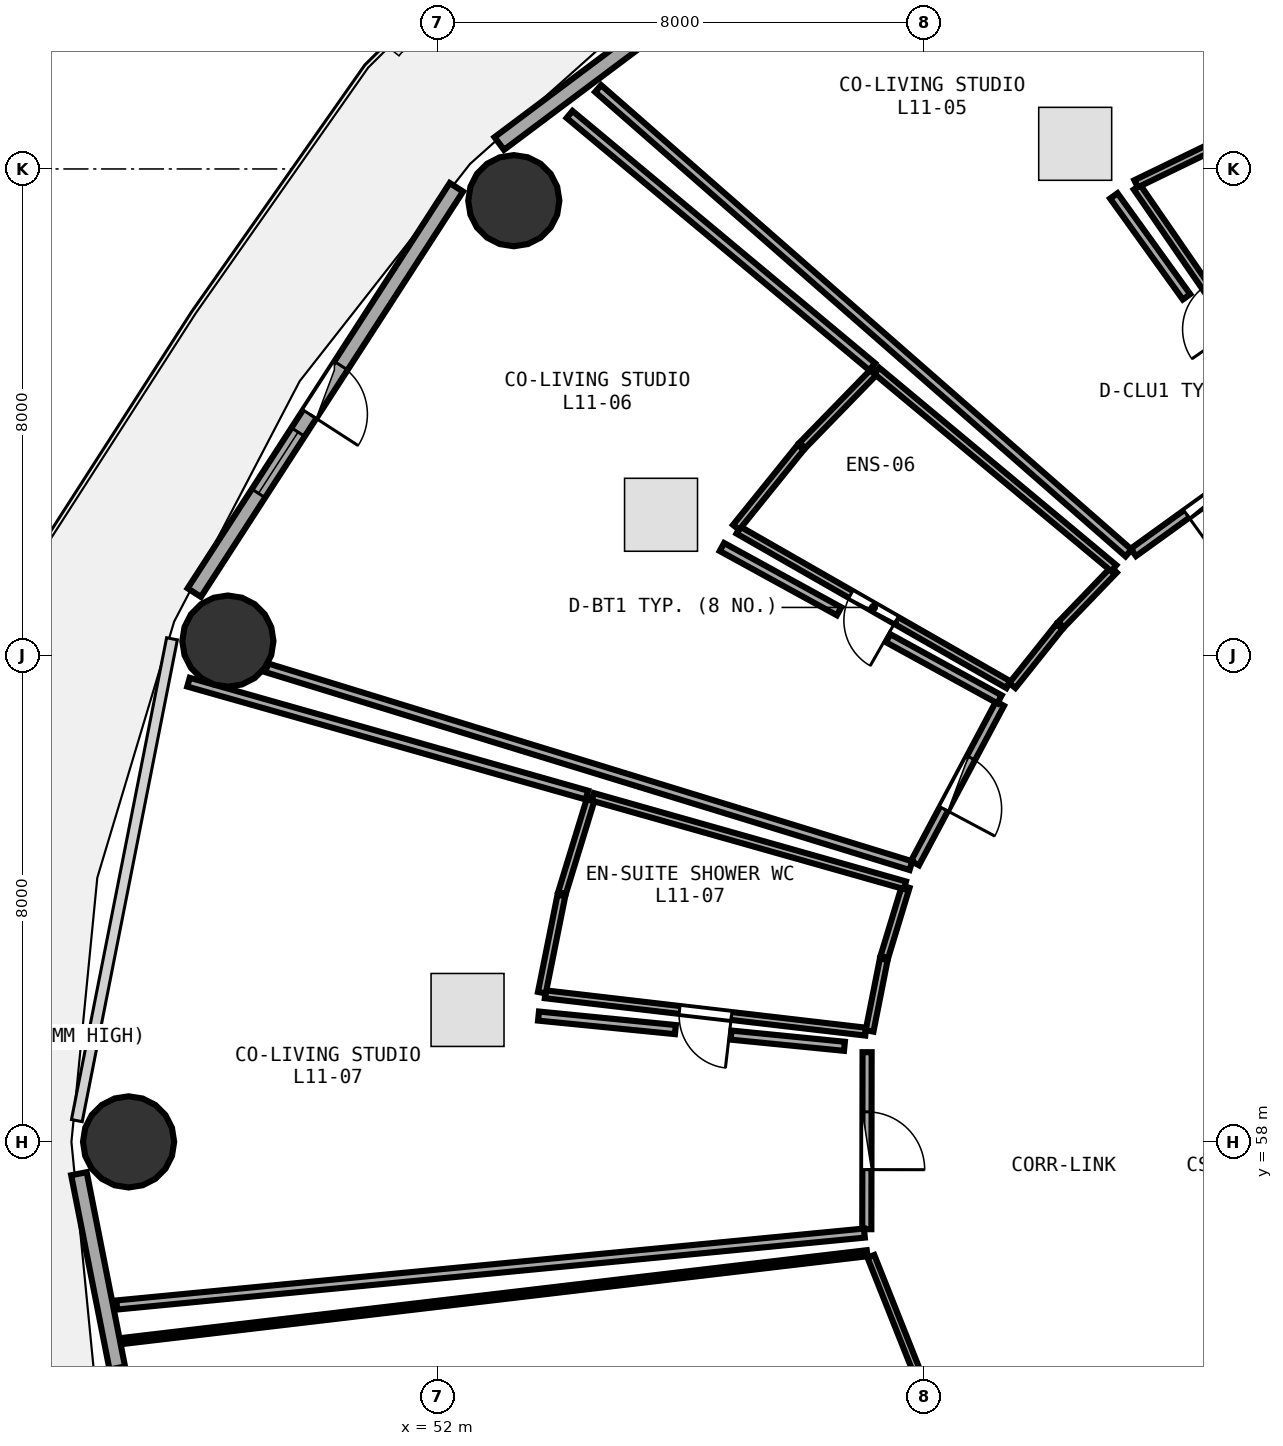
"""IFC4 building model, lengths in metres.
Left out: names, types, materials, properties, quantities, classifications, styles, units other than length and angle.
Written with IfcOpenShell. Run it as: python <this file> out.ifc"""

import sys

from ifc_helpers import new_model, si_unit, direction, frame, frame_2d, origin, origin_2d, place, context, subcontext, project, spatial, rectangle, circle, extrude, element, fill, save


model = new_model("IFC4")
c1 = context("Model", 3, precision=1e-05, world=origin(), true_north=direction((0.0, 1.0)))
c2 = subcontext(c1, "Body", "Model", "MODEL_VIEW")
j1 = project(units=[si_unit("LENGTHUNIT", "METRE"), si_unit("PLANEANGLEUNIT", "RADIAN")], contexts=[c1])
p1 = place(None, origin())
s1 = spatial("IfcSite", under=j1, at=p1, CompositionType="ELEMENT")
p2 = place(p1, origin())
s2 = spatial("IfcBuilding", under=s1, at=p2, CompositionType="ELEMENT")
p3 = place(p2, frame((0.0, 0.0, 45.0)))
s3 = spatial("IfcBuildingStorey", under=s2, at=p3, CompositionType="ELEMENT", Elevation=45.0)
for number, where, z_axis, x_axis in (
    (1, (53.256, 73.478, 0.0), (0.0, 0.0, 1.0), (1.0, 0.0, 0.0)),
    (2, (48.553, 66.236, 0.0), (0.0, 0.0, 1.0), (1.0, 0.0, 0.0)),
    (3, (46.92, 58.0, 0.0), (0.0, 0.0, 1.0), (1.0, 0.0, 0.0)),
):
    element("IfcColumn", number, at=place(p3, frame(where, z_axis=z_axis, x_axis=x_axis)), inside=s3, PredefinedType="COLUMN", context=c2, shape_type="SweptSolid", body=[
        extrude(circle(Radius=0.75, at=origin_2d()), origin(), (0.0, 0.0, 1.0), 3.75),
    ])
p4 = place(p3, frame((59.651, 79.389, 0.0), z_axis=(0.0, 0.0, 1.0), x_axis=(-0.80030733173, -0.599590005569, 0.0)))
e4 = element("IfcWall", 4, at=p4, inside=s3, PredefinedType="SOLIDWALL", context=c2, shape_type="SweptSolid", body=[
    extrude(rectangle(XDim=8.291, YDim=0.26, at=frame_2d((4.145, 0.0))), origin(), (0.0, 0.0, 1.0), 3.475),
])
p5 = place(p4, frame((3.345, 0.0, 0.85)))
e5 = element("IfcOpeningElement", 5, at=p5, cuts=e4, PredefinedType="OPENING", context=c2, shape_type="SweptSolid", body=[
    extrude(rectangle(XDim=1.6, YDim=1.45, at=frame_2d((0.8, 0.725))), frame((0.0, 0.14, 0.0), z_axis=(0.0, -1.0, 0.0), x_axis=(1.0, 0.0, 0.0)), (0.0, 0.0, 1.0), 0.28),
])
p6 = place(p3, frame((52.311, 73.698, 0.0), z_axis=(0.0, 0.0, 1.0), x_axis=(-0.543005114258, -0.839729388488, 0.0)))
e6 = element("IfcWall", 6, at=p6, inside=s3, PredefinedType="SOLIDWALL", context=c2, shape_type="SweptSolid", body=[
    extrude(rectangle(XDim=7.938, YDim=0.26, at=frame_2d((3.969, 0.0))), origin(), (0.0, 0.0, 1.0), 3.475),
])
p7 = place(p6, frame((3.494, 0.0, 0.0)))
e7 = element("IfcOpeningElement", 7, at=p7, cuts=e6, PredefinedType="OPENING", context=c2, shape_type="SweptSolid", body=[
    extrude(rectangle(XDim=0.95, YDim=2.1, at=frame_2d((0.475, 1.05))), frame((0.0, 0.14, 0.0), z_axis=(0.0, -1.0, 0.0), x_axis=(1.0, 0.0, 0.0)), (0.0, 0.0, 1.0), 0.28),
])
p8 = place(p6, frame((4.794, 0.0, 0.85)))
e8 = element("IfcOpeningElement", 8, at=p8, cuts=e6, PredefinedType="OPENING", context=c2, shape_type="SweptSolid", body=[
    extrude(rectangle(XDim=1.2, YDim=1.45, at=frame_2d((0.6, 0.725))), frame((0.0, 0.14, 0.0), z_axis=(0.0, -1.0, 0.0), x_axis=(1.0, 0.0, 0.0)), (0.0, 0.0, 1.0), 0.28),
])
p9 = place(p3, frame((46.104, 57.477, 0.0), z_axis=(0.0, 0.0, 1.0), x_axis=(0.193726159581, -0.98105564322, 0.0)))
e9 = element("IfcWall", 9, at=p9, inside=s3, PredefinedType="SOLIDWALL", context=c2, shape_type="SweptSolid", body=[
    extrude(rectangle(XDim=7.703, YDim=0.26, at=frame_2d((3.851, 0.0))), origin(), (0.0, 0.0, 1.0), 3.475),
])
p10 = place(p9, frame((3.231, 0.0, 0.85)))
e10 = element("IfcOpeningElement", 10, at=p10, cuts=e9, PredefinedType="OPENING", context=c2, shape_type="SweptSolid", body=[
    extrude(rectangle(XDim=1.6, YDim=1.45, at=frame_2d((0.8, 0.725))), frame((0.0, 0.14, 0.0), z_axis=(0.0, -1.0, 0.0), x_axis=(1.0, 0.0, 0.0)), (0.0, 0.0, 1.0), 0.28),
])
p11 = place(p3, frame((66.235, 69.738, 0.0), z_axis=(0.0, 0.0, 1.0), x_axis=(-0.567426867042, 0.823423797664, 0.0)))
e11 = element("IfcWall", 11, at=p11, inside=s3, PredefinedType="PLUMBINGWALL", context=c2, shape_type="SweptSolid", body=[
    extrude(rectangle(XDim=4.809, YDim=0.13, at=frame_2d((2.405, 0.0))), origin(), (0.0, 0.0, 1.0), 3.175),
])
p12 = place(p11, frame((1.975, 0.0, 0.0)))
e12 = element("IfcOpeningElement", 12, at=p12, cuts=e11, PredefinedType="OPENING", context=c2, shape_type="SweptSolid", body=[
    extrude(rectangle(XDim=0.86, YDim=2.05, at=frame_2d((0.43, 1.025))), frame((0.0, 0.075, 0.0), z_axis=(0.0, -1.0, 0.0), x_axis=(1.0, 0.0, 0.0)), (0.0, 0.0, 1.0), 0.15),
])
p13 = place(p3, frame((65.963, 69.511, 0.0), z_axis=(0.0, 0.0, 1.0), x_axis=(-0.811021116066, -0.585016879496, 0.0)))
e13 = element("IfcWall", 13, at=p13, inside=s3, PredefinedType="PARTITIONING", context=c2, shape_type="SweptSolid", body=[
    extrude(rectangle(XDim=3.106, YDim=0.15, at=frame_2d((1.553, 0.0))), origin(), (0.0, 0.0, 1.0), 2.875),
])
p14 = place(p13, frame((1.078, 0.0, 0.0)))
e14 = element("IfcOpeningElement", 14, at=p14, cuts=e13, PredefinedType="OPENING", context=c2, shape_type="SweptSolid", body=[
    extrude(rectangle(XDim=0.95, YDim=2.08, at=frame_2d((0.475, 1.04))), frame((0.0, 0.085, 0.0), z_axis=(0.0, -1.0, 0.0), x_axis=(1.0, 0.0, 0.0)), (0.0, 0.0, 1.0), 0.17),
])
p15 = place(p3, frame((61.39, 65.519, 0.0), z_axis=(0.0, 0.0, 1.0), x_axis=(-0.867813964862, 0.496889245598, 0.0)))
e15 = element("IfcWall", 15, at=p15, inside=s3, PredefinedType="PLUMBINGWALL", context=c2, shape_type="SweptSolid", body=[
    extrude(rectangle(XDim=5.115, YDim=0.13, at=frame_2d((2.557, 0.0))), origin(), (0.0, 0.0, 1.0), 2.875),
])
p16 = place(p15, frame((2.127, 0.0, 0.0)))
e16 = element("IfcOpeningElement", 16, at=p16, cuts=e15, PredefinedType="OPENING", context=c2, shape_type="SweptSolid", body=[
    extrude(rectangle(XDim=0.86, YDim=2.05, at=frame_2d((0.43, 1.025))), frame((0.0, 0.075, 0.0), z_axis=(0.0, -1.0, 0.0), x_axis=(1.0, 0.0, 0.0)), (0.0, 0.0, 1.0), 0.15),
])
p17 = place(p3, frame((61.251, 65.206, 0.0), z_axis=(0.0, 0.0, 1.0), x_axis=(-0.470332327533, -0.882489377657, 0.0)))
e17 = element("IfcWall", 17, at=p17, inside=s3, PredefinedType="PARTITIONING", context=c2, shape_type="SweptSolid", body=[
    extrude(rectangle(XDim=2.971, YDim=0.15, at=frame_2d((1.486, 0.0))), origin(), (0.0, 0.0, 1.0), 2.875),
])
p18 = place(p17, frame((1.011, 0.0, 0.0)))
e18 = element("IfcOpeningElement", 18, at=p18, cuts=e17, PredefinedType="OPENING", context=c2, shape_type="SweptSolid", body=[
    extrude(rectangle(XDim=0.95, YDim=2.08, at=frame_2d((0.475, 1.04))), frame((0.0, 0.085, 0.0), z_axis=(0.0, -1.0, 0.0), x_axis=(1.0, 0.0, 0.0)), (0.0, 0.0, 1.0), 0.17),
])
p19 = place(p3, frame((59.043, 59.813, 0.0), z_axis=(0.0, 0.0, 1.0), x_axis=(-0.99328280677, 0.115711994952, 0.0)))
e19 = element("IfcWall", 19, at=p19, inside=s3, PredefinedType="PLUMBINGWALL", context=c2, shape_type="SweptSolid", body=[
    extrude(rectangle(XDim=5.306, YDim=0.13, at=frame_2d((2.653, 0.0))), origin(), (0.0, 0.0, 1.0), 3.175),
])
p20 = place(p19, frame((2.223, 0.0, 0.0)))
e20 = element("IfcOpeningElement", 20, at=p20, cuts=e19, PredefinedType="OPENING", context=c2, shape_type="SweptSolid", body=[
    extrude(rectangle(XDim=0.86, YDim=2.05, at=frame_2d((0.43, 1.025))), frame((0.0, 0.075, 0.0), z_axis=(0.0, -1.0, 0.0), x_axis=(1.0, 0.0, 0.0)), (0.0, 0.0, 1.0), 0.15),
])
p21 = place(p3, frame((59.066, 59.475, 0.0), z_axis=(0.0, 0.0, 1.0), x_axis=(-0.001677287141, -0.999998593353, 0.0)))
e21 = element("IfcWall", 21, at=p21, inside=s3, PredefinedType="PARTITIONING", context=c2, shape_type="SweptSolid", body=[
    extrude(rectangle(XDim=2.911, YDim=0.15, at=frame_2d((1.456, 0.0))), origin(), (0.0, 0.0, 1.0), 2.875),
])
p22 = place(p21, frame((0.981, 0.0, 0.0)))
e22 = element("IfcOpeningElement", 22, at=p22, cuts=e21, PredefinedType="OPENING", context=c2, shape_type="SweptSolid", body=[
    extrude(rectangle(XDim=0.95, YDim=2.08, at=frame_2d((0.475, 1.04))), frame((0.0, 0.085, 0.0), z_axis=(0.0, -1.0, 0.0), x_axis=(1.0, 0.0, 0.0)), (0.0, 0.0, 1.0), 0.17),
])
p23 = place(p3, frame((59.128, 56.118, 0.0), z_axis=(0.0, 0.0, 1.0), x_axis=(0.369903929858, -0.929070009566, 0.0)))
e23 = element("IfcWall", 23, at=p23, inside=s3, PredefinedType="PARTITIONING", context=c2, shape_type="SweptSolid", body=[
    extrude(rectangle(XDim=5.693, YDim=0.12, at=frame_2d((2.846, 0.0))), origin(), (0.0, 0.0, 1.0), 2.875),
])
p24 = place(p23, frame((2.396, 0.0, 0.0)))
e24 = element("IfcOpeningElement", 24, at=p24, cuts=e23, PredefinedType="OPENING", context=c2, shape_type="SweptSolid", body=[
    extrude(rectangle(XDim=0.9, YDim=2.08, at=frame_2d((0.45, 1.04))), frame((0.0, 0.07, 0.0), z_axis=(0.0, -1.0, 0.0), x_axis=(1.0, 0.0, 0.0)), (0.0, 0.0, 1.0), 0.14),
])
p25 = place(p3, frame((63.49, 73.757, 0.0), z_axis=(0.0, 0.0, 1.0), x_axis=(0.899832096889, 0.436236400829, 0.0)))
e25 = element("IfcWall", 25, at=p25, inside=s3, PredefinedType="PLUMBINGWALL", context=c2, shape_type="SweptSolid", body=[
    extrude(rectangle(XDim=1.776, YDim=0.13, at=frame_2d((0.888, 0.0))), origin(), (0.0, 0.0, 1.0), 3.48),
])
p26 = place(p3, frame((63.366, 67.685, 0.0), z_axis=(0.0, 0.0, 1.0), x_axis=(-0.752403187404, 0.658702849231, 0.0)))
e26 = element("IfcWall", 26, at=p26, inside=s3, PredefinedType="PARTITIONING", context=c2, shape_type="SweptSolid", body=[
    extrude(rectangle(XDim=11.595, YDim=0.15, at=frame_2d((5.797, 0.0))), origin(), (0.0, 0.0, 1.0), 2.875),
])
p27 = place(p3, frame((64.367, 80.884, 0.0), z_axis=(0.0, 0.0, 1.0), x_axis=(0.395282873179, -0.918559442917, 0.0)))
e27 = element("IfcWall", 27, at=p27, inside=s3, PredefinedType="PARTITIONING", context=c2, shape_type="SweptSolid", body=[
    extrude(rectangle(XDim=6.113, YDim=0.15, at=frame_2d((3.057, 0.0))), origin(), (0.0, 0.0, 1.0), 2.875),
])
p28 = place(p3, frame((63.123, 73.558, 0.0), z_axis=(0.0, 0.0, 1.0), x_axis=(0.58432672942, -0.811518498425, 0.0)))
e28 = element("IfcWall", 28, at=p28, inside=s3, PredefinedType="PARTITIONING", context=c2, shape_type="SweptSolid", body=[
    extrude(rectangle(XDim=2.046, YDim=0.15, at=frame_2d((1.023, 0.0))), origin(), (0.0, 0.0, 1.0), 3.175),
])
p29 = place(p3, frame((63.125, 67.408, 0.0), z_axis=(0.0, 0.0, 1.0), x_axis=(-0.693342211096, -0.720608477824, 0.0)))
e29 = element("IfcWall", 29, at=p29, inside=s3, PredefinedType="PLUMBINGWALL", context=c2, shape_type="SweptSolid", body=[
    extrude(rectangle(XDim=1.254, YDim=0.13, at=frame_2d((0.627, 0.0))), origin(), (0.0, 0.0, 1.0), 2.875),
])
p30 = place(p3, frame((62.229, 66.474, 0.0), z_axis=(0.0, 0.0, 1.0), x_axis=(-0.624263214868, -0.781214079854, 0.0)))
e30 = element("IfcWall", 30, at=p30, inside=s3, PredefinedType="PLUMBINGWALL", context=c2, shape_type="SweptSolid", body=[
    extrude(rectangle(XDim=1.241, YDim=0.13, at=frame_2d((0.621, 0.0))), origin(), (0.0, 0.0, 1.0), 2.875),
])
p31 = place(p3, frame((56.912, 68.106, 0.0), z_axis=(0.0, 0.0, 1.0), x_axis=(0.628152519701, 0.778090233837, 0.0)))
e31 = element("IfcWall", 31, at=p31, inside=s3, PredefinedType="PLUMBINGWALL", context=c2, shape_type="SweptSolid", body=[
    extrude(rectangle(XDim=1.693, YDim=0.13, at=frame_2d((0.847, 0.0))), origin(), (0.0, 0.0, 1.0), 3.175),
])
p32 = place(p3, frame((58.002, 69.453, 0.0), z_axis=(0.0, 0.0, 1.0), x_axis=(0.697337129747, 0.716743278641, 0.0)))
e32 = element("IfcWall", 32, at=p32, inside=s3, PredefinedType="PLUMBINGWALL", context=c2, shape_type="SweptSolid", body=[
    extrude(rectangle(XDim=1.711, YDim=0.13, at=frame_2d((0.855, 0.0))), origin(), (0.0, 0.0, 1.0), 2.875),
])
p33 = place(p3, frame((59.224, 70.681, 0.0), z_axis=(0.0, 0.0, 1.0), x_axis=(0.768509127281, -0.63983882446, 0.0)))
e33 = element("IfcWall", 33, at=p33, inside=s3, PredefinedType="PLUMBINGWALL", context=c2, shape_type="SweptSolid", body=[
    extrude(rectangle(XDim=5.074, YDim=0.13, at=frame_2d((2.537, 0.0))), origin(), (0.0, 0.0, 1.0), 3.175),
])
p34 = place(p3, frame((59.787, 62.543, 0.0), z_axis=(0.0, 0.0, 1.0), x_axis=(-0.955941269752, 0.29355798198, 0.0)))
e34 = element("IfcWall", 34, at=p34, inside=s3, PredefinedType="PARTITIONING", context=c2, shape_type="SweptSolid", body=[
    extrude(rectangle(XDim=11.083, YDim=0.15, at=frame_2d((5.542, 0.0))), origin(), (0.0, 0.0, 1.0), 3.175),
])
p35 = place(p3, frame((54.173, 74.896, 0.0), z_axis=(0.0, 0.0, 1.0), x_axis=(0.768100814479, -0.640328930157, 0.0)))
e35 = element("IfcWall", 35, at=p35, inside=s3, PredefinedType="PARTITIONING", context=c2, shape_type="SweptSolid", body=[
    extrude(rectangle(XDim=6.479, YDim=0.15, at=frame_2d((3.24, 0.0))), origin(), (0.0, 0.0, 1.0), 2.875),
])
p36 = place(p3, frame((56.678, 67.783, 0.0), z_axis=(0.0, 0.0, 1.0), x_axis=(0.876780673324, -0.480890477017, 0.0)))
e36 = element("IfcWall", 36, at=p36, inside=s3, PredefinedType="PARTITIONING", context=c2, shape_type="SweptSolid", body=[
    extrude(rectangle(XDim=2.197, YDim=0.15, at=frame_2d((1.099, 0.0))), origin(), (0.0, 0.0, 1.0), 3.175),
])
p37 = place(p3, frame((59.411, 66.283, 0.0), z_axis=(0.0, 0.0, 1.0), x_axis=(0.876772690424, -0.480905031505, 0.0)))
e37 = element("IfcWall", 37, at=p37, inside=s3, PredefinedType="PARTITIONING", context=c2, shape_type="SweptSolid", body=[
    extrude(rectangle(XDim=2.09, YDim=0.15, at=frame_2d((1.045, 0.0))), origin(), (0.0, 0.0, 1.0), 2.875),
])
p38 = place(p3, frame((59.701, 62.196, 0.0), z_axis=(0.0, 0.0, 1.0), x_axis=(-0.29128243511, -0.956637100993, 0.0)))
e38 = element("IfcWall", 38, at=p38, inside=s3, PredefinedType="PLUMBINGWALL", context=c2, shape_type="SweptSolid", body=[
    extrude(rectangle(XDim=1.206, YDim=0.13, at=frame_2d((0.603, 0.0))), origin(), (0.0, 0.0, 1.0), 3.48),
])
p39 = place(p3, frame((59.34, 61.003, 0.0), z_axis=(0.0, 0.0, 1.0), x_axis=(-0.194199574792, -0.980962040627, 0.0)))
e39 = element("IfcWall", 39, at=p39, inside=s3, PredefinedType="PLUMBINGWALL", context=c2, shape_type="SweptSolid", body=[
    extrude(rectangle(XDim=1.201, YDim=0.13, at=frame_2d((0.6, 0.0))), origin(), (0.0, 0.0, 1.0), 3.48),
])
p40 = place(p3, frame((53.717, 60.454, 0.0), z_axis=(0.0, 0.0, 1.0), x_axis=(0.196892919049, 0.98042499888, 0.0)))
e40 = element("IfcWall", 40, at=p40, inside=s3, PredefinedType="PLUMBINGWALL", context=c2, shape_type="SweptSolid", body=[
    extrude(rectangle(XDim=1.632, YDim=0.13, at=frame_2d((0.816, 0.0))), origin(), (0.0, 0.0, 1.0), 3.48),
])
p41 = place(p3, frame((54.048, 62.092, 0.0), z_axis=(0.0, 0.0, 1.0), x_axis=(0.293405839872, 0.955987977502, 0.0)))
e41 = element("IfcWall", 41, at=p41, inside=s3, PredefinedType="PLUMBINGWALL", context=c2, shape_type="SweptSolid", body=[
    extrude(rectangle(XDim=1.64, YDim=0.13, at=frame_2d((0.82, 0.0))), origin(), (0.0, 0.0, 1.0), 3.48),
])
p42 = place(p3, frame((54.554, 63.674, 0.0), z_axis=(0.0, 0.0, 1.0), x_axis=(0.962194506937, -0.272363233238, 0.0)))
e42 = element("IfcWall", 42, at=p42, inside=s3, PredefinedType="PLUMBINGWALL", context=c2, shape_type="SweptSolid", body=[
    extrude(rectangle(XDim=5.335, YDim=0.13, at=frame_2d((2.667, 0.0))), origin(), (0.0, 0.0, 1.0), 3.175),
])
p43 = place(p3, frame((59.021, 56.5, 0.0), z_axis=(0.0, 0.0, 1.0), x_axis=(-0.995408087514, -0.095722198638, 0.0)))
e43 = element("IfcWall", 43, at=p43, inside=s3, PredefinedType="PARTITIONING", context=c2, shape_type="SweptSolid", body=[
    extrude(rectangle(XDim=12.352, YDim=0.15, at=frame_2d((6.176, 0.0))), origin(), (0.0, 0.0, 1.0), 2.875),
])
p44 = place(p3, frame((47.906, 65.56, 0.0), z_axis=(0.0, 0.0, 1.0), x_axis=(0.962107451281, -0.272670592821, 0.0)))
e44 = element("IfcWall", 44, at=p44, inside=s3, PredefinedType="PARTITIONING", context=c2, shape_type="SweptSolid", body=[
    extrude(rectangle(XDim=6.811, YDim=0.15, at=frame_2d((3.406, 0.0))), origin(), (0.0, 0.0, 1.0), 2.875),
])
p45 = place(p3, frame((53.662, 60.069, 0.0), z_axis=(0.0, 0.0, 1.0), x_axis=(0.995156134458, -0.098307009162, 0.0)))
e45 = element("IfcWall", 45, at=p45, inside=s3, PredefinedType="PARTITIONING", context=c2, shape_type="SweptSolid", body=[
    extrude(rectangle(XDim=2.262, YDim=0.15, at=frame_2d((1.131, 0.0))), origin(), (0.0, 0.0, 1.0), 3.175),
])
p46 = place(p3, frame((56.829, 59.756, 0.0), z_axis=(0.0, 0.0, 1.0), x_axis=(0.995148801126, -0.098381215772, 0.0)))
e46 = element("IfcWall", 46, at=p46, inside=s3, PredefinedType="PARTITIONING", context=c2, shape_type="SweptSolid", body=[
    extrude(rectangle(XDim=1.874, YDim=0.15, at=frame_2d((0.937, 0.0))), origin(), (0.0, 0.0, 1.0), 3.48),
])
p47 = place(p3, frame((46.808, 54.725, 0.0), z_axis=(0.0, 0.0, 1.0), x_axis=(0.993128309916, 0.117030594475, 0.0)))
e47 = element("IfcWall", 47, at=p47, inside=s3, PredefinedType="PARTITIONING", context=c2, shape_type="SweptSolid", body=[
    extrude(rectangle(XDim=12.344, YDim=0.1, at=frame_2d((6.172, 0.0))), origin(), (0.0, 0.0, 1.0), 2.875),
])
p48 = place(p7, frame((0.95, 0.0, 0.0), z_axis=(0.0, 0.0, 1.0), x_axis=(-1.0, 0.0, 0.0)))
e48 = element("IfcDoor", 48, at=p48, inside=s3, OperationType="SINGLE_SWING_LEFT", PredefinedType="DOOR", context=c2, shape_type="SweptSolid", body=[
    extrude(rectangle(XDim=0.95, YDim=2.1, at=frame_2d((0.475, 1.05))), frame((0.0, 0.025, 0.0), z_axis=(0.0, -1.0, 0.0), x_axis=(1.0, 0.0, 0.0)), (0.0, 0.0, 1.0), 0.05),
])
fill(e7, e48)
p49 = place(p8, origin())
e49 = element("IfcWindow", 49, at=p49, inside=s3, PartitioningType="SINGLE_PANEL", PredefinedType="WINDOW", context=c2, shape_type="SweptSolid", body=[
    extrude(rectangle(XDim=1.2, YDim=1.45, at=frame_2d((0.6, 0.725))), frame((0.0, 0.03, 0.0), z_axis=(0.0, -1.0, 0.0), x_axis=(1.0, 0.0, 0.0)), (0.0, 0.0, 1.0), 0.06),
])
fill(e8, e49)
p50 = place(p14, origin())
e50 = element("IfcDoor", 50, at=p50, inside=s3, OperationType="SINGLE_SWING_RIGHT", PredefinedType="DOOR", context=c2, shape_type="SweptSolid", body=[
    extrude(rectangle(XDim=0.95, YDim=2.08, at=frame_2d((0.475, 1.04))), frame((0.0, 0.025, 0.0), z_axis=(0.0, -1.0, 0.0), x_axis=(1.0, 0.0, 0.0)), (0.0, 0.0, 1.0), 0.05),
])
fill(e14, e50)
p51 = place(p16, origin())
e51 = element("IfcDoor", 51, at=p51, inside=s3, OperationType="SINGLE_SWING_LEFT", PredefinedType="DOOR", context=c2, shape_type="SweptSolid", body=[
    extrude(rectangle(XDim=0.86, YDim=2.05, at=frame_2d((0.43, 1.025))), frame((0.0, 0.025, 0.0), z_axis=(0.0, -1.0, 0.0), x_axis=(1.0, 0.0, 0.0)), (0.0, 0.0, 1.0), 0.05),
])
fill(e16, e51)
p52 = place(p18, origin())
e52 = element("IfcDoor", 52, at=p52, inside=s3, OperationType="SINGLE_SWING_RIGHT", PredefinedType="DOOR", context=c2, shape_type="SweptSolid", body=[
    extrude(rectangle(XDim=0.95, YDim=2.08, at=frame_2d((0.475, 1.04))), frame((0.0, 0.025, 0.0), z_axis=(0.0, -1.0, 0.0), x_axis=(1.0, 0.0, 0.0)), (0.0, 0.0, 1.0), 0.05),
])
fill(e18, e52)
p53 = place(p20, origin())
e53 = element("IfcDoor", 53, at=p53, inside=s3, OperationType="SINGLE_SWING_LEFT", PredefinedType="DOOR", context=c2, shape_type="SweptSolid", body=[
    extrude(rectangle(XDim=0.86, YDim=2.05, at=frame_2d((0.43, 1.025))), frame((0.0, 0.025, 0.0), z_axis=(0.0, -1.0, 0.0), x_axis=(1.0, 0.0, 0.0)), (0.0, 0.0, 1.0), 0.05),
])
fill(e20, e53)
p54 = place(p22, origin())
e54 = element("IfcDoor", 54, at=p54, inside=s3, OperationType="SINGLE_SWING_RIGHT", PredefinedType="DOOR", context=c2, shape_type="SweptSolid", body=[
    extrude(rectangle(XDim=0.95, YDim=2.08, at=frame_2d((0.475, 1.04))), frame((0.0, 0.025, 0.0), z_axis=(0.0, -1.0, 0.0), x_axis=(1.0, 0.0, 0.0)), (0.0, 0.0, 1.0), 0.05),
])
fill(e22, e54)
save(model, sys.argv[1])
